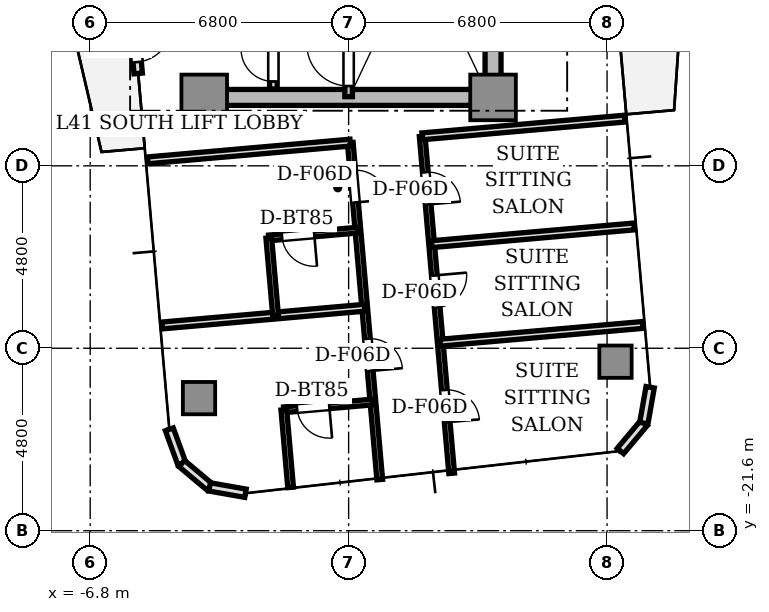
"""IFC4 building model, lengths in metres.
Left out: names, types, materials, properties, quantities, classifications, styles, units other than length and angle.
Written with IfcOpenShell. Run it as: python <this file> out.ifc"""

import sys

from ifc_helpers import new_model, si_unit, direction, frame, frame_2d, origin, origin_2d, place, context, subcontext, project, spatial, rectangle, extrude, source, transform, mapped, element, fill, save


model = new_model("IFC4")
c1 = context("Model", 3, precision=1e-05, world=origin(), true_north=direction((0.0, 1.0)))
c2 = subcontext(c1, "Body", "Model", "MODEL_VIEW")
j1 = project(units=[si_unit("LENGTHUNIT", "METRE"), si_unit("PLANEANGLEUNIT", "RADIAN")], contexts=[c1])
p1 = place(None, origin())
s1 = spatial("IfcSite", under=j1, at=p1, CompositionType="ELEMENT")
p2 = place(p1, origin())
s2 = spatial("IfcBuilding", under=s1, at=p2, CompositionType="ELEMENT")
p3 = place(p2, frame((0.0, 0.0, 150.6)))
s3 = spatial("IfcBuildingStorey", under=s2, at=p3, CompositionType="ELEMENT", Elevation=150.6)
p4 = place(p3, frame((-3.55, -10.2, 0.0), z_axis=(0.0, 0.0, 1.0), x_axis=(1.0, 0.0, 0.0)))
e1 = element("IfcWall", 1, at=p4, inside=s3, PredefinedType="SHEAR", context=c2, shape_type="SweptSolid", body=[
    extrude(rectangle(XDim=7.1, YDim=0.42, at=frame_2d((3.55, 0.0))), origin(), (0.0, 0.0, 1.0), 3.11),
])
p5 = place(p3, frame((3.8, -9.75, 0.0), z_axis=(0.0, 0.0, 1.0), x_axis=(0.0, 1.0, 0.0)))
e2 = element("IfcWall", 2, at=p5, inside=s3, PredefinedType="SHEAR", context=c2, shape_type="SweptSolid", body=[
    extrude(rectangle(XDim=6.9, YDim=0.42, at=frame_2d((3.45, 0.0))), origin(), (0.0, 0.0, 1.0), 3.11),
])
m1 = source(origin(), c2, "Body", "SweptSolid", [
    extrude(rectangle(XDim=1.2, YDim=1.2, at=origin_2d()), origin(), (0.0, 0.0, 1.0), 3.11),
])
for number, where, z_axis, x_axis in (
    (3, (-3.8, -10.2, 0.0), (0.0, 0.0, 1.0), (1.0, 0.0, 0.0)),
    (4, (3.8, -10.2, 0.0), (0.0, 0.0, 1.0), (1.0, 0.0, 0.0)),
):
    element("IfcColumn", number, at=place(p3, frame(where, z_axis=z_axis, x_axis=x_axis)), inside=s3, PredefinedType="COLUMN", context=c2, shape_type="MappedRepresentation", body=[
        mapped(m1, transform((0.0, 0.0, 0.0), scale=1.0)),
    ])
m2 = source(origin(), c2, "Body", "SweptSolid", [
    extrude(rectangle(XDim=0.85, YDim=0.85, at=origin_2d()), origin(), (0.0, 0.0, 1.0), 3.11),
])
for number, where, z_axis, x_axis in (
    (5, (-3.936, -18.112, 0.0), (0.0, 0.0, 1.0), (1.0, 0.0, 0.0)),
    (6, (7.022, -17.153, 0.0), (0.0, 0.0, 1.0), (1.0, 0.0, 0.0)),
):
    element("IfcColumn", number, at=place(p3, frame(where, z_axis=z_axis, x_axis=x_axis)), inside=s3, PredefinedType="COLUMN", context=c2, shape_type="MappedRepresentation", body=[
        mapped(m2, transform((0.0, 0.0, 0.0), scale=1.0)),
    ])
p6 = place(p3, frame((-5.772, -6.879, 0.0), z_axis=(0.0, 0.0, 1.0), x_axis=(0.087168071984, -0.996193619346, 0.0)))
e7 = element("IfcWall", 7, at=p6, inside=s3, PredefinedType="STANDARD", context=c2, shape_type="SweptSolid", body=[
    extrude(rectangle(XDim=2.7, YDim=0.22, at=frame_2d((1.35, 0.0))), origin(), (0.0, 0.0, 1.0), 3.11),
])
p7 = place(p6, frame((1.4, 0.0, 0.0)))
e8 = element("IfcOpeningElement", 8, at=p7, cuts=e7, PredefinedType="OPENING", context=c2, shape_type="SweptSolid", body=[
    extrude(rectangle(XDim=1.0, YDim=2.2, at=frame_2d((0.5, 1.1))), frame((0.0, 0.12, 0.0), z_axis=(0.0, -1.0, 0.0), x_axis=(1.0, 0.0, 0.0)), (0.0, 0.0, 1.0), 0.24),
])
p8 = place(p3, frame((-4.718, -18.933, 0.0), z_axis=(0.0, 0.0, 1.0), x_axis=(0.34188635151, -0.939741306239, 0.0)))
e9 = element("IfcWall", 9, at=p8, inside=s3, PredefinedType="STANDARD", context=c2, shape_type="SweptSolid", body=[
    extrude(rectangle(XDim=0.958, YDim=0.22, at=frame_2d((0.479, 0.0))), origin(), (0.0, 0.0, 1.0), 3.11),
])
for number, where, z_axis, x_axis in (
    (10, (-4.39, -19.833, 0.0), (0.0, 0.0, 1.0), (0.766, -0.643, 0.0)),
    (11, (-3.657, -20.449, 0.0), (0.0, 0.0, 1.0), (0.985, -0.174, 0.0)),
):
    element("IfcWall", number, at=place(p3, frame(where, z_axis=z_axis, x_axis=x_axis)), inside=s3, PredefinedType="STANDARD", context=c2, shape_type="SweptSolid", body=[
        extrude(rectangle(XDim=0.958, YDim=0.22, at=frame_2d((0.479, 0.0))), origin(), (0.0, 0.0, 1.0), 3.11),
    ])
for number, where, z_axis, x_axis in (
    (12, (7.152, -19.503, 0.0), (0.0, 0.0, 1.0), (0.643, 0.766, 0.0)),
    (13, (7.768, -18.769, 0.0), (0.0, 0.0, 1.0), (0.174, 0.985, 0.0)),
):
    element("IfcWall", number, at=place(p3, frame(where, z_axis=z_axis, x_axis=x_axis)), inside=s3, PredefinedType="STANDARD", context=c2, shape_type="SweptSolid", body=[
        extrude(rectangle(XDim=0.958, YDim=0.22, at=frame_2d((0.479, 0.0))), origin(), (0.0, 0.0, 1.0), 3.11),
    ])
p9 = place(p3, frame((0.0, -10.18, 0.0), z_axis=(0.0, 0.0, 1.0), x_axis=(0.0, 1.0, 0.0)))
e14 = element("IfcWall", 14, at=p9, inside=s3, PredefinedType="SOLIDWALL", context=c2, shape_type="SweptSolid", body=[
    extrude(rectangle(XDim=7.68, YDim=0.2, at=frame_2d((3.84, 0.0))), origin(), (0.0, 0.0, 1.0), 3.11),
])
p10 = place(p9, frame((0.28, 0.0, 0.0)))
e15 = element("IfcOpeningElement", 15, at=p10, cuts=e14, PredefinedType="OPENING", context=c2, shape_type="SweptSolid", body=[
    extrude(rectangle(XDim=1.1, YDim=2.15, at=frame_2d((0.55, 1.075))), frame((0.0, 0.11, 0.0), z_axis=(0.0, -1.0, 0.0), x_axis=(1.0, 0.0, 0.0)), (0.0, 0.0, 1.0), 0.22),
])
p11 = place(p3, frame((-1.98, -9.98, 0.0), z_axis=(0.0, 0.0, 1.0), x_axis=(0.0, 1.0, 0.0)))
e16 = element("IfcWall", 16, at=p11, inside=s3, PredefinedType="SOLIDWALL", context=c2, shape_type="SweptSolid", body=[
    extrude(rectangle(XDim=4.66, YDim=0.2, at=frame_2d((2.33, 0.0))), origin(), (0.0, 0.0, 1.0), 2.66),
])
p12 = place(p11, frame((0.2, 0.0, 0.0)))
e17 = element("IfcOpeningElement", 17, at=p12, cuts=e16, PredefinedType="OPENING", context=c2, shape_type="SweptSolid", body=[
    extrude(rectangle(XDim=0.85, YDim=2.1, at=frame_2d((0.425, 1.05))), frame((0.0, 0.11, 0.0), z_axis=(0.0, -1.0, 0.0), x_axis=(1.0, 0.0, 0.0)), (0.0, 0.0, 1.0), 0.22),
])
p13 = place(p3, frame((1.936, -11.224, 0.0), z_axis=(0.0, 0.0, 1.0), x_axis=(0.087151636982, -0.996195057291, 0.0)))
e18 = element("IfcWall", 18, at=p13, inside=s3, PredefinedType="PARTITIONING", context=c2, shape_type="SweptSolid", body=[
    extrude(rectangle(XDim=8.9, YDim=0.15, at=frame_2d((4.45, 0.0))), origin(), (0.0, 0.0, 1.0), 2.66),
])
p14 = place(p13, frame((0.949, 0.0, 0.0)))
e19 = element("IfcOpeningElement", 19, at=p14, cuts=e18, PredefinedType="OPENING", context=c2, shape_type="SweptSolid", body=[
    extrude(rectangle(XDim=0.85, YDim=2.1, at=frame_2d((0.425, 1.05))), frame((0.0, 0.085, 0.0), z_axis=(0.0, -1.0, 0.0), x_axis=(1.0, 0.0, 0.0)), (0.0, 0.0, 1.0), 0.17),
])
p15 = place(p13, frame((3.674, 0.0, 0.0)))
e20 = element("IfcOpeningElement", 20, at=p15, cuts=e18, PredefinedType="OPENING", context=c2, shape_type="SweptSolid", body=[
    extrude(rectangle(XDim=0.85, YDim=2.1, at=frame_2d((0.425, 1.05))), frame((0.0, 0.085, 0.0), z_axis=(0.0, -1.0, 0.0), x_axis=(1.0, 0.0, 0.0)), (0.0, 0.0, 1.0), 0.17),
])
p16 = place(p13, frame((6.7, 0.0, 0.0)))
e21 = element("IfcOpeningElement", 21, at=p16, cuts=e18, PredefinedType="OPENING", context=c2, shape_type="SweptSolid", body=[
    extrude(rectangle(XDim=0.85, YDim=2.1, at=frame_2d((0.425, 1.05))), frame((0.0, 0.085, 0.0), z_axis=(0.0, -1.0, 0.0), x_axis=(1.0, 0.0, 0.0)), (0.0, 0.0, 1.0), 0.17),
])
p17 = place(p3, frame((0.043, -11.39, 0.0), z_axis=(0.0, 0.0, 1.0), x_axis=(0.087178860582, -0.996192675273, 0.0)))
e22 = element("IfcWall", 22, at=p17, inside=s3, PredefinedType="PARTITIONING", context=c2, shape_type="SweptSolid", body=[
    extrude(rectangle(XDim=8.9, YDim=0.15, at=frame_2d((4.45, 0.0))), origin(), (0.0, 0.0, 1.0), 2.66),
])
p18 = place(p17, frame((0.73, 0.0, 0.0)))
e23 = element("IfcOpeningElement", 23, at=p18, cuts=e22, PredefinedType="OPENING", context=c2, shape_type="SweptSolid", body=[
    extrude(rectangle(XDim=0.85, YDim=2.1, at=frame_2d((0.425, 1.05))), frame((0.0, 0.085, 0.0), z_axis=(0.0, -1.0, 0.0), x_axis=(1.0, 0.0, 0.0)), (0.0, 0.0, 1.0), 0.17),
])
p19 = place(p17, frame((5.181, 0.0, 0.0)))
e24 = element("IfcOpeningElement", 24, at=p19, cuts=e22, PredefinedType="OPENING", context=c2, shape_type="SweptSolid", body=[
    extrude(rectangle(XDim=0.85, YDim=2.1, at=frame_2d((0.425, 1.05))), frame((0.0, 0.085, 0.0), z_axis=(0.0, -1.0, 0.0), x_axis=(1.0, 0.0, 0.0)), (0.0, 0.0, 1.0), 0.17),
])
for number, where, z_axis, x_axis in (
    (25, (1.936, -11.224, 0.0), (0.0, 0.0, 1.0), (0.996, 0.087, 0.0)),
    (26, (-5.287, -11.856, 0.0), (0.0, 0.0, 1.0), (0.996, 0.087, 0.0)),
    (27, (2.184, -14.061, 0.0), (0.0, 0.0, 1.0), (0.996, 0.087, 0.0)),
    (28, (2.411, -16.653, 0.0), (0.0, 0.0, 1.0), (0.996, 0.087, 0.0)),
    (29, (0.423, -15.734, 0.0), (0.0, 0.0, 1.0), (-0.996, -0.087, 0.0)),
):
    element("IfcWall", number, at=place(p3, frame(where, z_axis=z_axis, x_axis=x_axis)), inside=s3, PredefinedType="PARTITIONING", context=c2, shape_type="SweptSolid", body=[
        extrude(rectangle(XDim=5.35, YDim=0.18, at=frame_2d((2.675, 0.0))), origin(), (0.0, 0.0, 1.0), 2.66),
    ])
p20 = place(p3, frame((0.244, -13.692, 0.0), z_axis=(0.0, 0.0, 1.0), x_axis=(-0.996197656711, -0.087121918963, 0.0)))
e30 = element("IfcWall", 30, at=p20, inside=s3, PredefinedType="PARTITIONING", context=c2, shape_type="SweptSolid", body=[
    extrude(rectangle(XDim=2.354, YDim=0.15, at=frame_2d((1.177, 0.0))), origin(), (0.0, 0.0, 1.0), 2.66),
])
p21 = place(p20, frame((1.154, 0.0, 0.0)))
e31 = element("IfcOpeningElement", 31, at=p21, cuts=e30, PredefinedType="OPENING", context=c2, shape_type="SweptSolid", body=[
    extrude(rectangle(XDim=0.85, YDim=2.1, at=frame_2d((0.425, 1.05))), frame((0.0, 0.085, 0.0), z_axis=(0.0, -1.0, 0.0), x_axis=(1.0, 0.0, 0.0)), (0.0, 0.0, 1.0), 0.17),
])
p22 = place(p3, frame((-2.101, -13.897, 0.0), z_axis=(0.0, 0.0, 1.0), x_axis=(0.087174336889, -0.99619307114, 0.0)))
e32 = element("IfcWall", 32, at=p22, inside=s3, PredefinedType="PARTITIONING", context=c2, shape_type="SweptSolid", body=[
    extrude(rectangle(XDim=2.05, YDim=0.15, at=frame_2d((1.025, 0.0))), origin(), (0.0, 0.0, 1.0), 2.66),
])
p23 = place(p3, frame((0.64, -18.213, 0.0), z_axis=(0.0, 0.0, 1.0), x_axis=(-0.996188649846, -0.087224846905, 0.0)))
e33 = element("IfcWall", 33, at=p23, inside=s3, PredefinedType="PARTITIONING", context=c2, shape_type="SweptSolid", body=[
    extrude(rectangle(XDim=2.354, YDim=0.15, at=frame_2d((1.177, 0.0))), origin(), (0.0, 0.0, 1.0), 2.66),
])
p24 = place(p23, frame((1.154, 0.0, 0.0)))
e34 = element("IfcOpeningElement", 34, at=p24, cuts=e33, PredefinedType="OPENING", context=c2, shape_type="SweptSolid", body=[
    extrude(rectangle(XDim=0.85, YDim=2.1, at=frame_2d((0.425, 1.05))), frame((0.0, 0.085, 0.0), z_axis=(0.0, -1.0, 0.0), x_axis=(1.0, 0.0, 0.0)), (0.0, 0.0, 1.0), 0.17),
])
p25 = place(p3, frame((-1.705, -18.419, 0.0), z_axis=(0.0, 0.0, 1.0), x_axis=(0.087056149438, -0.996203406361, 0.0)))
e35 = element("IfcWall", 35, at=p25, inside=s3, PredefinedType="PARTITIONING", context=c2, shape_type="SweptSolid", body=[
    extrude(rectangle(XDim=2.05, YDim=0.15, at=frame_2d((1.025, 0.0))), origin(), (0.0, 0.0, 1.0), 2.66),
])
m3 = source(origin(), c2, "Body", "SweptSolid", [
    extrude(rectangle(XDim=1.0, YDim=0.05, at=origin_2d()), origin(), (0.0, 0.0, 1.0), 2.2),
])
p26 = place(p7, frame((0.5, 0.0, 0.0)))
e36 = element("IfcDoor", 36, at=p26, inside=s3, OperationType="SINGLE_SWING_LEFT", PredefinedType="DOOR", context=c2, shape_type="MappedRepresentation", body=[
    mapped(m3, transform((0.0, 0.0, 0.0), scale=1.0)),
])
fill(e8, e36)
m4 = source(origin(), c2, "Body", "SweptSolid", [
    extrude(rectangle(XDim=1.1, YDim=0.05, at=origin_2d()), origin(), (0.0, 0.0, 1.0), 2.15),
])
p27 = place(p10, frame((0.55, 0.0, 0.0)))
e37 = element("IfcDoor", 37, at=p27, inside=s3, OperationType="SINGLE_SWING_RIGHT", PredefinedType="DOOR", context=c2, shape_type="MappedRepresentation", body=[
    mapped(m4, transform((0.0, 0.0, 0.0), scale=1.0)),
])
fill(e15, e37)
m5 = source(origin(), c2, "Body", "SweptSolid", [
    extrude(rectangle(XDim=0.85, YDim=0.05, at=origin_2d()), origin(), (0.0, 0.0, 1.0), 2.1),
])
p28 = place(p12, frame((0.425, 0.0, 0.0)))
e38 = element("IfcDoor", 38, at=p28, inside=s3, OperationType="SINGLE_SWING_RIGHT", PredefinedType="DOOR", context=c2, shape_type="MappedRepresentation", body=[
    mapped(m5, transform((0.0, 0.0, 0.0), scale=1.0)),
])
fill(e17, e38)
p29 = place(p14, frame((0.425, 0.0, 0.0)))
e39 = element("IfcDoor", 39, at=p29, inside=s3, OperationType="SINGLE_SWING_RIGHT", PredefinedType="DOOR", context=c2, shape_type="MappedRepresentation", body=[
    mapped(m5, transform((0.0, 0.0, 0.0), scale=1.0)),
])
fill(e19, e39)
p30 = place(p15, frame((0.425, 0.0, 0.0)))
e40 = element("IfcDoor", 40, at=p30, inside=s3, OperationType="SINGLE_SWING_LEFT", PredefinedType="DOOR", context=c2, shape_type="MappedRepresentation", body=[
    mapped(m5, transform((0.0, 0.0, 0.0), scale=1.0)),
])
fill(e20, e40)
p31 = place(p16, frame((0.425, 0.0, 0.0)))
e41 = element("IfcDoor", 41, at=p31, inside=s3, OperationType="SINGLE_SWING_RIGHT", PredefinedType="DOOR", context=c2, shape_type="MappedRepresentation", body=[
    mapped(m5, transform((0.0, 0.0, 0.0), scale=1.0)),
])
fill(e21, e41)
p32 = place(p21, frame((0.425, 0.0, 0.0)))
e42 = element("IfcDoor", 42, at=p32, inside=s3, OperationType="SINGLE_SWING_LEFT", PredefinedType="DOOR", context=c2, shape_type="MappedRepresentation", body=[
    mapped(m5, transform((0.0, 0.0, 0.0), scale=1.0)),
])
fill(e31, e42)
p33 = place(p18, frame((0.425, 0.0, 0.0)))
e43 = element("IfcDoor", 43, at=p33, inside=s3, OperationType="SINGLE_SWING_RIGHT", PredefinedType="DOOR", context=c2, shape_type="MappedRepresentation", body=[
    mapped(m5, transform((0.0, 0.0, 0.0), scale=1.0)),
])
fill(e23, e43)
p34 = place(p24, frame((0.425, 0.0, 0.0)))
e44 = element("IfcDoor", 44, at=p34, inside=s3, OperationType="SINGLE_SWING_LEFT", PredefinedType="DOOR", context=c2, shape_type="MappedRepresentation", body=[
    mapped(m5, transform((0.0, 0.0, 0.0), scale=1.0)),
])
fill(e34, e44)
p35 = place(p19, frame((0.425, 0.0, 0.0)))
e45 = element("IfcDoor", 45, at=p35, inside=s3, OperationType="SINGLE_SWING_RIGHT", PredefinedType="DOOR", context=c2, shape_type="MappedRepresentation", body=[
    mapped(m5, transform((0.0, 0.0, 0.0), scale=1.0)),
])
fill(e24, e45)
save(model, sys.argv[1])
